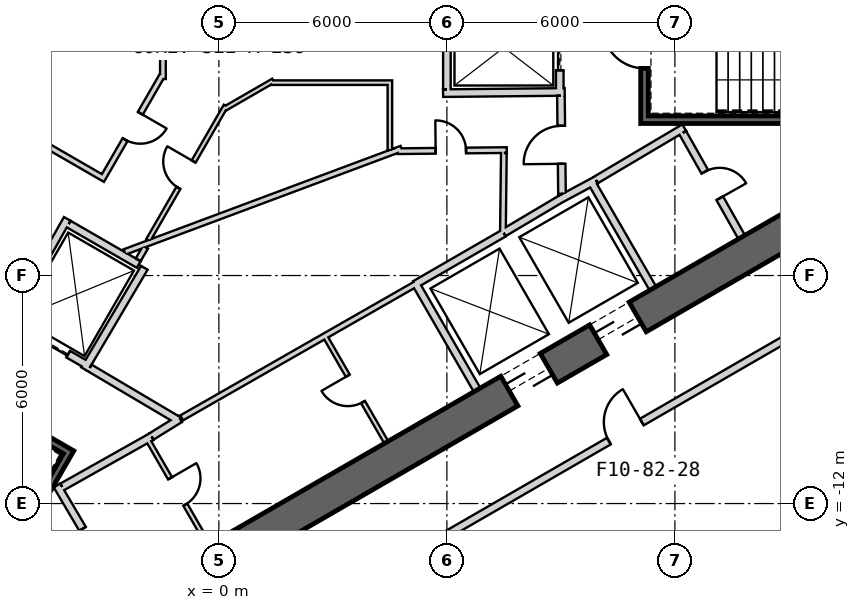
"""IFC4 building model, lengths in metres.
Left out: names, types, materials, properties, quantities, classifications, styles, units other than length and angle.
Written with IfcOpenShell. Run it as: python <this file> out.ifc"""

import sys

from ifc_helpers import new_model, si_unit, direction, frame, frame_2d, origin, place, context, subcontext, project, spatial, rectangle, extrude, element, fill, save


model = new_model("IFC4")
c1 = context("Model", 3, precision=1e-05, world=origin(), true_north=direction((0.0, 1.0)))
c2 = subcontext(c1, "Body", "Model", "MODEL_VIEW")
j1 = project(units=[si_unit("LENGTHUNIT", "METRE"), si_unit("PLANEANGLEUNIT", "RADIAN")], contexts=[c1])
p1 = place(None, origin())
s1 = spatial("IfcSite", under=j1, at=p1, CompositionType="ELEMENT")
p2 = place(p1, origin())
s2 = spatial("IfcBuilding", under=s1, at=p2, CompositionType="ELEMENT")
p3 = place(p2, frame((0.0, 0.0, 357.2)))
s3 = spatial("IfcBuildingStorey", under=s2, at=p3, CompositionType="ELEMENT", Elevation=357.2)
p4 = place(p3, frame((-7.825, -17.97, 0.0), z_axis=(0.0, 0.0, 1.0), x_axis=(0.866028369851, 0.499994862586, 0.0)))
e1 = element("IfcWall", 1, at=p4, inside=s3, PredefinedType="SHEAR", context=c2, shape_type="SweptSolid", body=[
    extrude(rectangle(XDim=31.523, YDim=0.9, at=frame_2d((15.762, 0.0))), origin(), (0.0, 0.0, 1.0), 3.9),
])
p5 = place(p4, frame((17.862, 0.0, 0.0)))
e2 = element("IfcOpeningElement", 2, at=p5, cuts=e1, PredefinedType="OPENING", context=c2, shape_type="SweptSolid", body=[
    extrude(rectangle(XDim=1.2, YDim=2.4, at=frame_2d((0.6, 1.2))), frame((0.0, 0.46, 0.0), z_axis=(0.0, -1.0, 0.0), x_axis=(1.0, 0.0, 0.0)), (0.0, 0.0, 1.0), 0.92),
])
p6 = place(p4, frame((20.562, 0.0, 0.0)))
e3 = element("IfcOpeningElement", 3, at=p6, cuts=e1, PredefinedType="OPENING", context=c2, shape_type="SweptSolid", body=[
    extrude(rectangle(XDim=1.2, YDim=2.4, at=frame_2d((0.6, 1.2))), frame((0.0, 0.46, 0.0), z_axis=(0.0, -1.0, 0.0), x_axis=(1.0, 0.0, 0.0)), (0.0, 0.0, 1.0), 0.92),
])
p7 = place(p4, frame((26.712, 0.0, 0.0)))
e4 = element("IfcOpeningElement", 4, at=p7, cuts=e1, PredefinedType="OPENING", context=c2, shape_type="SweptSolid", body=[
    extrude(rectangle(XDim=1.2, YDim=2.4, at=frame_2d((0.6, 1.2))), frame((0.0, 0.46, 0.0), z_axis=(0.0, -1.0, 0.0), x_axis=(1.0, 0.0, 0.0)), (0.0, 0.0, 1.0), 0.92),
])
p8 = place(p4, frame((3.612, 0.0, 0.0)))
e5 = element("IfcOpeningElement", 5, at=p8, cuts=e1, PredefinedType="OPENING", context=c2, shape_type="SweptSolid", body=[
    extrude(rectangle(XDim=1.2, YDim=2.4, at=frame_2d((0.6, 1.2))), frame((0.0, 0.46, 0.0), z_axis=(0.0, -1.0, 0.0), x_axis=(1.0, 0.0, 0.0)), (0.0, 0.0, 1.0), 0.92),
])
p9 = place(p3, frame((6.795, -9.01, 0.0), z_axis=(0.0, 0.0, 1.0), x_axis=(-0.499984717929, 0.866034226713, 0.0)))
e6 = element("IfcWall", 6, at=p9, inside=s3, PredefinedType="PLUMBINGWALL", context=c2, shape_type="SweptSolid", body=[
    extrude(rectangle(XDim=3.25, YDim=0.2, at=frame_2d((1.625, 0.0))), origin(), (0.0, 0.0, 1.0), 3.6),
])
p10 = place(p3, frame((5.159, -6.236, 0.0), z_axis=(0.0, 0.0, 1.0), x_axis=(0.866036505625, 0.499980770555, 0.0)))
e7 = element("IfcWall", 7, at=p10, inside=s3, PredefinedType="PLUMBINGWALL", context=c2, shape_type="SweptSolid", body=[
    extrude(rectangle(XDim=2.7, YDim=0.2, at=frame_2d((1.35, 0.0))), origin(), (0.0, 0.0, 1.0), 3.6),
])
p11 = place(p3, frame((9.795, -3.525, 0.0), z_axis=(0.0, 0.0, 1.0), x_axis=(0.499984717929, -0.866034226713, 0.0)))
e8 = element("IfcWall", 8, at=p11, inside=s3, PredefinedType="PLUMBINGWALL", context=c2, shape_type="SweptSolid", body=[
    extrude(rectangle(XDim=3.25, YDim=0.2, at=frame_2d((1.625, 0.0))), origin(), (0.0, 0.0, 1.0), 3.6),
])
p12 = place(p3, frame((8.974, -3.999, 0.0), z_axis=(0.0, 0.0, 1.0), x_axis=(0.880907015104, 0.473289373154, 0.0)))
e9 = element("IfcWall", 9, at=p12, inside=s3, PredefinedType="PLUMBINGWALL", context=c2, shape_type="SweptSolid", body=[
    extrude(rectangle(XDim=1.078, YDim=0.2, at=frame_2d((0.539, 0.0))), origin(), (0.0, 0.0, 1.0), 3.6),
])
p13 = place(p3, frame((7.493, -4.878, 0.0), z_axis=(0.0, 0.0, 1.0), x_axis=(0.859981807212, 0.510324691999, 0.0)))
e10 = element("IfcWall", 10, at=p13, inside=s3, PredefinedType="PLUMBINGWALL", context=c2, shape_type="SweptSolid", body=[
    extrude(rectangle(XDim=1.845, YDim=0.2, at=frame_2d((0.922, 0.0))), origin(), (0.0, 0.0, 1.0), 3.6),
])
p14 = place(p3, frame((11.1, -1.9, -0.3), z_axis=(0.0, 0.0, 1.0), x_axis=(1.0, 0.0, 0.0)))
e11 = element("IfcWall", 11, at=p14, inside=s3, PredefinedType="SHEAR", context=c2, shape_type="SweptSolid", body=[
    extrude(rectangle(XDim=7.9, YDim=0.2, at=frame_2d((3.95, 0.0))), origin(), (0.0, 0.0, 1.0), 3.9),
])
p15 = place(p3, frame((11.2, -1.8, -0.3), z_axis=(0.0, 0.0, 1.0), x_axis=(0.0, 1.0, 0.0)))
e12 = element("IfcWall", 12, at=p15, inside=s3, PredefinedType="SHEAR", context=c2, shape_type="SweptSolid", body=[
    extrude(rectangle(XDim=3.6, YDim=0.2, at=frame_2d((1.8, 0.0))), origin(), (0.0, 0.0, 1.0), 3.9),
])
p16 = place(p15, frame((1.25, 0.0, 0.3)))
e13 = element("IfcOpeningElement", 13, at=p16, cuts=e12, PredefinedType="OPENING", context=c2, shape_type="SweptSolid", body=[
    extrude(rectangle(XDim=1.1, YDim=2.1, at=frame_2d((0.55, 1.05))), frame((0.0, 0.11, 0.0), z_axis=(0.0, -1.0, 0.0), x_axis=(1.0, 0.0, 0.0)), (0.0, 0.0, 1.0), 0.22),
])
p17 = place(p3, frame((8.97, 1.2, 0.0), z_axis=(0.0, 0.0, 1.0), x_axis=(0.0, -1.0, 0.0)))
e14 = element("IfcWall", 14, at=p17, inside=s3, PredefinedType="PLUMBINGWALL", context=c2, shape_type="SweptSolid", body=[
    extrude(rectangle(XDim=2.4, YDim=0.2, at=frame_2d((1.2, 0.0))), origin(), (0.0, 0.0, 1.0), 3.6),
])
p18 = place(p17, frame((0.6, 0.0, 0.0)))
e15 = element("IfcOpeningElement", 15, at=p18, cuts=e14, PredefinedType="OPENING", context=c2, shape_type="SweptSolid", body=[
    extrude(rectangle(XDim=1.2, YDim=2.4, at=frame_2d((0.6, 1.2))), frame((0.0, 0.11, 0.0), z_axis=(0.0, -1.0, 0.0), x_axis=(1.0, 0.0, 0.0)), (0.0, 0.0, 1.0), 0.22),
])
p19 = place(p3, frame((5.9, -1.201, 0.0), z_axis=(0.0, 0.0, 1.0), x_axis=(0.999950064753, 0.009993397809, 0.0)))
e16 = element("IfcWall", 16, at=p19, inside=s3, PredefinedType="PLUMBINGWALL", context=c2, shape_type="SweptSolid", body=[
    extrude(rectangle(XDim=3.2, YDim=0.2, at=frame_2d((1.6, 0.0))), origin(), (0.0, 0.0, 1.0), 3.6),
])
p20 = place(p3, frame((6.0, -1.1, 0.0), z_axis=(0.0, 0.0, 1.0), x_axis=(0.0, 1.0, 0.0)))
e17 = element("IfcWall", 17, at=p20, inside=s3, PredefinedType="PLUMBINGWALL", context=c2, shape_type="SweptSolid", body=[
    extrude(rectangle(XDim=2.28, YDim=0.2, at=frame_2d((1.14, 0.0))), origin(), (0.0, 0.0, 1.0), 3.6),
])
p21 = place(p3, frame((-3.905, -10.563, -0.3), z_axis=(0.0, 0.0, 1.0), x_axis=(-0.500012932018, -0.866017937352, 0.0)))
e18 = element("IfcWall", 18, at=p21, inside=s3, PredefinedType="SHEAR", context=c2, shape_type="SweptSolid", body=[
    extrude(rectangle(XDim=8.1, YDim=0.2, at=frame_2d((4.05, 0.0))), origin(), (0.0, 0.0, 1.0), 3.9),
])
p22 = place(p3, frame((-4.041, -10.599, -0.3), z_axis=(0.0, 0.0, 1.0), x_axis=(-0.866047807691, 0.499961193289, 0.0)))
e19 = element("IfcWall", 19, at=p22, inside=s3, PredefinedType="SHEAR", context=c2, shape_type="SweptSolid", body=[
    extrude(rectangle(XDim=3.6, YDim=0.2, at=frame_2d((1.8, 0.0))), origin(), (0.0, 0.0, 1.0), 3.9),
])
p23 = place(p22, frame((1.25, 0.0, 0.3)))
e20 = element("IfcOpeningElement", 20, at=p23, cuts=e19, PredefinedType="OPENING", context=c2, shape_type="SweptSolid", body=[
    extrude(rectangle(XDim=1.1, YDim=2.1, at=frame_2d((0.55, 1.05))), frame((0.0, 0.11, 0.0), z_axis=(0.0, -1.0, 0.0), x_axis=(1.0, 0.0, 0.0)), (0.0, 0.0, 1.0), 0.22),
])
p24 = place(p3, frame((-3.446, -8.368, 0.0), z_axis=(0.0, 0.0, 1.0), x_axis=(-0.866024647952, 0.500001309137, 0.0)))
e21 = element("IfcWall", 21, at=p24, inside=s3, PredefinedType="PLUMBINGWALL", context=c2, shape_type="SweptSolid", body=[
    extrude(rectangle(XDim=2.4, YDim=0.2, at=frame_2d((1.2, 0.0))), origin(), (0.0, 0.0, 1.0), 3.6),
])
p25 = place(p24, frame((0.6, 0.0, 0.0)))
e22 = element("IfcOpeningElement", 22, at=p25, cuts=e21, PredefinedType="OPENING", context=c2, shape_type="SweptSolid", body=[
    extrude(rectangle(XDim=1.2, YDim=2.4, at=frame_2d((0.6, 1.2))), frame((0.0, 0.11, 0.0), z_axis=(0.0, -1.0, 0.0), x_axis=(1.0, 0.0, 0.0)), (0.0, 0.0, 1.0), 0.22),
])
p26 = place(p3, frame((-1.961, -5.796, 0.0), z_axis=(0.0, 0.0, 1.0), x_axis=(-0.508647062354, -0.860975125052, 0.0)))
e23 = element("IfcWall", 23, at=p26, inside=s3, PredefinedType="PLUMBINGWALL", context=c2, shape_type="SweptSolid", body=[
    extrude(rectangle(XDim=3.1, YDim=0.2, at=frame_2d((1.55, 0.0))), origin(), (0.0, 0.0, 1.0), 3.6),
])
p27 = place(p3, frame((-3.99, -4.509, 0.0), z_axis=(0.0, 0.0, 1.0), x_axis=(-0.491358283181, -0.870957540612, 0.0)))
e24 = element("IfcWall", 24, at=p27, inside=s3, PredefinedType="PLUMBINGWALL", context=c2, shape_type="SweptSolid", body=[
    extrude(rectangle(XDim=3.2, YDim=0.2, at=frame_2d((1.6, 0.0))), origin(), (0.0, 0.0, 1.0), 3.6),
])
p28 = place(p3, frame((-3.953, -4.646, 0.0), z_axis=(0.0, 0.0, 1.0), x_axis=(0.866065302921, -0.4999308863, 0.0)))
e25 = element("IfcWall", 25, at=p28, inside=s3, PredefinedType="PLUMBINGWALL", context=c2, shape_type="SweptSolid", body=[
    extrude(rectangle(XDim=2.264, YDim=0.2, at=frame_2d((1.132, 0.0))), origin(), (0.0, 0.0, 1.0), 3.6),
])
p29 = place(p3, frame((2.067, -11.74, 0.0), z_axis=(0.0, 0.0, 1.0), x_axis=(-0.499984717929, 0.866034226713, 0.0)))
e26 = element("IfcWall", 26, at=p29, inside=s3, PredefinedType="PARTITIONING", context=c2, shape_type="SweptSolid", body=[
    extrude(rectangle(XDim=3.25, YDim=0.12, at=frame_2d((1.625, 0.0))), origin(), (0.0, 0.0, 1.0), 3.6),
])
p30 = place(p3, frame((-4.26, -11.524, 0.0), z_axis=(0.0, 0.0, 1.0), x_axis=(0.507997497166, -0.861358544901, 0.0)))
e27 = element("IfcWall", 27, at=p30, inside=s3, PredefinedType="PARTITIONING", context=c2, shape_type="SweptSolid", body=[
    extrude(rectangle(XDim=3.35, YDim=0.2, at=frame_2d((1.675, 0.0))), origin(), (0.0, 0.0, 1.0), 3.6),
])
p31 = place(p3, frame((-1.024, -9.771, 0.0), z_axis=(0.0, 0.0, 1.0), x_axis=(-0.866029903013, -0.499992207027, 0.0)))
e28 = element("IfcWall", 28, at=p31, inside=s3, PredefinedType="PARTITIONING", context=c2, shape_type="SweptSolid", body=[
    extrude(rectangle(XDim=3.578, YDim=0.2, at=frame_2d((1.789, 0.0))), origin(), (0.0, 0.0, 1.0), 3.6),
])
p32 = place(p31, frame((1.389, 0.0, 0.0)))
e29 = element("IfcOpeningElement", 29, at=p32, cuts=e28, PredefinedType="OPENING", context=c2, shape_type="SweptSolid", body=[
    extrude(rectangle(XDim=0.8, YDim=2.1, at=frame_2d((0.4, 1.05))), frame((0.0, 0.11, 0.0), z_axis=(0.0, -1.0, 0.0), x_axis=(1.0, 0.0, 0.0)), (0.0, 0.0, 1.0), 0.22),
])
p33 = place(p3, frame((-1.023, -9.772, 0.0), z_axis=(0.0, 0.0, 1.0), x_axis=(0.874290944206, 0.485402250592, 0.0)))
e30 = element("IfcWall", 30, at=p33, inside=s3, PredefinedType="PARTITIONING", context=c2, shape_type="SweptSolid", body=[
    extrude(rectangle(XDim=1.723, YDim=0.12, at=frame_2d((0.861, 0.0))), origin(), (0.0, 0.0, 1.0), 3.6),
])
p34 = place(p3, frame((0.483, -8.936, 0.0), z_axis=(0.0, 0.0, 1.0), x_axis=(0.866028230842, 0.499995103361, 0.0)))
e31 = element("IfcWall", 31, at=p34, inside=s3, PredefinedType="PARTITIONING", context=c2, shape_type="SweptSolid", body=[
    extrude(rectangle(XDim=5.4, YDim=0.12, at=frame_2d((2.7, 0.0))), origin(), (0.0, 0.0, 1.0), 3.6),
])
p35 = place(p34, frame((2.3, 0.0, 0.0)))
e32 = element("IfcOpeningElement", 32, at=p35, cuts=e31, PredefinedType="OPENING", context=c2, shape_type="SweptSolid", body=[
    extrude(rectangle(XDim=0.8, YDim=2.1, at=frame_2d((0.4, 1.05))), frame((0.0, 0.07, 0.0), z_axis=(0.0, -1.0, 0.0), x_axis=(1.0, 0.0, 0.0)), (0.0, 0.0, 1.0), 0.14),
])
p36 = place(p3, frame((12.245, -2.109, 0.0), z_axis=(0.0, 0.0, 1.0), x_axis=(-0.860414880418, -0.509594185166, 0.0)))
e33 = element("IfcWall", 33, at=p36, inside=s3, PredefinedType="PARTITIONING", context=c2, shape_type="SweptSolid", body=[
    extrude(rectangle(XDim=2.7, YDim=0.2, at=frame_2d((1.35, 0.0))), origin(), (0.0, 0.0, 1.0), 3.6),
])
p37 = place(p3, frame((13.758, -4.99, 0.0), z_axis=(0.0, 0.0, 1.0), x_axis=(-0.491993409184, 0.87059892334, 0.0)))
e34 = element("IfcWall", 34, at=p37, inside=s3, PredefinedType="PARTITIONING", context=c2, shape_type="SweptSolid", body=[
    extrude(rectangle(XDim=3.15, YDim=0.2, at=frame_2d((1.575, 0.0))), origin(), (0.0, 0.0, 1.0), 3.6),
])
p38 = place(p37, frame((1.175, 0.0, 0.0)))
e35 = element("IfcOpeningElement", 35, at=p38, cuts=e34, PredefinedType="OPENING", context=c2, shape_type="SweptSolid", body=[
    extrude(rectangle(XDim=0.8, YDim=2.1, at=frame_2d((0.4, 1.05))), frame((0.0, 0.11, 0.0), z_axis=(0.0, -1.0, 0.0), x_axis=(1.0, 0.0, 0.0)), (0.0, 0.0, 1.0), 0.22),
])
p39 = place(p3, frame((9.029, -3.851, 0.0), z_axis=(0.0, 0.0, 1.0), x_axis=(-0.010783593937, 0.99994185536, 0.0)))
e36 = element("IfcWall", 36, at=p39, inside=s3, PredefinedType="PARTITIONING", context=c2, shape_type="SweptSolid", body=[
    extrude(rectangle(XDim=2.581, YDim=0.2, at=frame_2d((1.291, 0.0))), origin(), (0.0, 0.0, 1.0), 3.6),
])
p40 = place(p39, frame((0.791, 0.0, 0.0)))
e37 = element("IfcOpeningElement", 37, at=p40, cuts=e36, PredefinedType="OPENING", context=c2, shape_type="SweptSolid", body=[
    extrude(rectangle(XDim=1.0, YDim=2.1, at=frame_2d((0.5, 1.05))), frame((0.0, 0.11, 0.0), z_axis=(0.0, -1.0, 0.0), x_axis=(1.0, 0.0, 0.0)), (0.0, 0.0, 1.0), 0.22),
])
p41 = place(p3, frame((-3.401, -8.43, 0.0), z_axis=(0.0, 0.0, 1.0), x_axis=(0.860630814782, -0.509229418482, 0.0)))
e38 = element("IfcWall", 38, at=p41, inside=s3, PredefinedType="PARTITIONING", context=c2, shape_type="SweptSolid", body=[
    extrude(rectangle(XDim=2.582, YDim=0.2, at=frame_2d((1.291, 0.0))), origin(), (0.0, 0.0, 1.0), 3.6),
])
p42 = place(p3, frame((0.224, -1.761, 0.0), z_axis=(0.0, 0.0, 1.0), x_axis=(-0.494327216836, -0.869275907118, 0.0)))
e39 = element("IfcWall", 39, at=p42, inside=s3, PredefinedType="PARTITIONING", context=c2, shape_type="SweptSolid", body=[
    extrude(rectangle(XDim=4.487, YDim=0.12, at=frame_2d((2.244, 0.0))), origin(), (0.0, 0.0, 1.0), 3.6),
])
p43 = place(p42, frame((1.895, 0.0, 0.0)))
e40 = element("IfcOpeningElement", 40, at=p43, cuts=e39, PredefinedType="OPENING", context=c2, shape_type="SweptSolid", body=[
    extrude(rectangle(XDim=0.8, YDim=2.1, at=frame_2d((0.4, 1.05))), frame((0.0, 0.07, 0.0), z_axis=(0.0, -1.0, 0.0), x_axis=(1.0, 0.0, 0.0)), (0.0, 0.0, 1.0), 0.14),
])
p44 = place(p3, frame((1.605, -1.023, 0.0), z_axis=(0.0, 0.0, 1.0), x_axis=(-0.866001581989, -0.50004125829, 0.0)))
e41 = element("IfcWall", 41, at=p44, inside=s3, PredefinedType="PARTITIONING", context=c2, shape_type="SweptSolid", body=[
    extrude(rectangle(XDim=1.635, YDim=0.12, at=frame_2d((0.817, 0.0))), origin(), (0.0, 0.0, 1.0), 3.6),
])
p45 = place(p3, frame((4.56, -1.075, 0.0), z_axis=(0.0, 0.0, 1.0), x_axis=(-1.0, 0.0, 0.0)))
e42 = element("IfcWall", 42, at=p45, inside=s3, PredefinedType="PARTITIONING", context=c2, shape_type="SweptSolid", body=[
    extrude(rectangle(XDim=3.026, YDim=0.12, at=frame_2d((1.513, 0.0))), origin(), (0.0, 0.0, 1.0), 3.6),
])
p46 = place(p3, frame((4.5, -2.76, 0.0), z_axis=(0.0, 0.0, 1.0), x_axis=(0.0, 1.0, 0.0)))
e43 = element("IfcWall", 43, at=p46, inside=s3, PredefinedType="PARTITIONING", context=c2, shape_type="SweptSolid", body=[
    extrude(rectangle(XDim=1.625, YDim=0.12, at=frame_2d((0.812, 0.0))), origin(), (0.0, 0.0, 1.0), 3.6),
])
p47 = place(p3, frame((7.56, -2.7, 0.0), z_axis=(0.0, 0.0, 1.0), x_axis=(-1.0, 0.0, 0.0)))
e44 = element("IfcWall", 44, at=p47, inside=s3, PredefinedType="PARTITIONING", context=c2, shape_type="SweptSolid", body=[
    extrude(rectangle(XDim=3.0, YDim=0.12, at=frame_2d((1.5, 0.0))), origin(), (0.0, 0.0, 1.0), 3.6),
])
p48 = place(p3, frame((7.475, -4.865, 0.0), z_axis=(0.0, 0.0, 1.0), x_axis=(0.011716133148, 0.999931363757, 0.0)))
e45 = element("IfcWall", 45, at=p48, inside=s3, PredefinedType="PARTITIONING", context=c2, shape_type="SweptSolid", body=[
    extrude(rectangle(XDim=2.105, YDim=0.12, at=frame_2d((1.052, 0.0))), origin(), (0.0, 0.0, 1.0), 3.6),
])
p49 = place(p3, frame((-1.689, -0.879, 0.0), z_axis=(0.0, 0.0, 1.0), x_axis=(0.0, 1.0, 0.0)))
e46 = element("IfcWall", 46, at=p49, inside=s3, PredefinedType="PARTITIONING", context=c2, shape_type="SweptSolid", body=[
    extrude(rectangle(XDim=1.635, YDim=0.12, at=frame_2d((0.818, 0.0))), origin(), (0.0, 0.0, 1.0), 3.6),
])
p50 = place(p3, frame((-3.211, -3.412, 0.0), z_axis=(0.0, 0.0, 1.0), x_axis=(0.499983190554, 0.866035108505, 0.0)))
e47 = element("IfcWall", 47, at=p50, inside=s3, PredefinedType="PARTITIONING", context=c2, shape_type="SweptSolid", body=[
    extrude(rectangle(XDim=3.026, YDim=0.12, at=frame_2d((1.513, 0.0))), origin(), (0.0, 0.0, 1.0), 3.6),
])
p51 = place(p50, frame((1.143, 0.0, 0.0)))
e48 = element("IfcOpeningElement", 48, at=p51, cuts=e47, PredefinedType="OPENING", context=c2, shape_type="SweptSolid", body=[
    extrude(rectangle(XDim=0.8, YDim=2.1, at=frame_2d((0.4, 1.05))), frame((0.0, 0.07, 0.0), z_axis=(0.0, -1.0, 0.0), x_axis=(1.0, 0.0, 0.0)), (0.0, 0.0, 1.0), 0.14),
])
p52 = place(p3, frame((-4.64, -2.517, 0.0), z_axis=(0.0, 0.0, 1.0), x_axis=(0.866015446554, -0.500017246033, 0.0)))
e49 = element("IfcWall", 49, at=p52, inside=s3, PredefinedType="PARTITIONING", context=c2, shape_type="SweptSolid", body=[
    extrude(rectangle(XDim=1.625, YDim=0.12, at=frame_2d((0.812, 0.0))), origin(), (0.0, 0.0, 1.0), 3.6),
])
p53 = place(p3, frame((1.303, -17.376, 0.0), z_axis=(0.0, 0.0, 1.0), x_axis=(0.866024719138, 0.50000118584, 0.0)))
e50 = element("IfcWall", 50, at=p53, inside=s3, PredefinedType="PARTITIONING", context=c2, shape_type="SweptSolid", body=[
    extrude(rectangle(XDim=14.305, YDim=0.2, at=frame_2d((7.152, 0.0))), origin(), (0.0, 0.0, 1.0), 3.07),
])
p54 = place(p53, frame((6.644, 0.0, 0.0)))
e51 = element("IfcOpeningElement", 51, at=p54, cuts=e50, PredefinedType="OPENING", context=c2, shape_type="SweptSolid", body=[
    extrude(rectangle(XDim=1.0, YDim=2.1, at=frame_2d((0.5, 1.05))), frame((0.0, 0.11, 0.0), z_axis=(0.0, -1.0, 0.0), x_axis=(1.0, 0.0, 0.0)), (0.0, 0.0, 1.0), 0.22),
])
p55 = place(p3, frame((13.691, -10.224, 0.0), z_axis=(0.0, 0.0, 1.0), x_axis=(0.866025593094, 0.499999672107, 0.0)))
e52 = element("IfcWall", 52, at=p55, inside=s3, PredefinedType="PARTITIONING", context=c2, shape_type="SweptSolid", body=[
    extrude(rectangle(XDim=9.631, YDim=0.2, at=frame_2d((4.815, 0.0))), origin(), (0.0, 0.0, 1.0), 2.97),
])
p56 = place(p55, frame((4.315, 0.0, 0.0)))
e53 = element("IfcOpeningElement", 53, at=p56, cuts=e52, PredefinedType="OPENING", context=c2, shape_type="SweptSolid", body=[
    extrude(rectangle(XDim=1.0, YDim=2.1, at=frame_2d((0.5, 1.05))), frame((0.0, 0.11, 0.0), z_axis=(0.0, -1.0, 0.0), x_axis=(1.0, 0.0, 0.0)), (0.0, 0.0, 1.0), 0.22),
])
p57 = place(p3, frame((13.731, -10.317, 0.0), z_axis=(0.0, 0.0, 1.0), x_axis=(0.544248008525, -0.838924373955, 0.0)))
e54 = element("IfcWall", 54, at=p57, inside=s3, PredefinedType="PARTITIONING", context=c2, shape_type="SweptSolid", body=[
    extrude(rectangle(XDim=8.325, YDim=0.2, at=frame_2d((4.162, 0.0))), origin(), (0.0, 0.0, 1.0), 3.6),
])
p58 = place(p16, origin())
e55 = element("IfcDoor", 55, at=p58, inside=s3, OperationType="SINGLE_SWING_RIGHT", PredefinedType="USERDEFINED", context=c2, shape_type="SweptSolid", body=[
    extrude(rectangle(XDim=1.1, YDim=2.1, at=frame_2d((0.55, 1.05))), frame((0.0, 0.025, 0.0), z_axis=(0.0, -1.0, 0.0), x_axis=(1.0, 0.0, 0.0)), (0.0, 0.0, 1.0), 0.05),
])
fill(e13, e55)
p59 = place(p40, origin())
e56 = element("IfcDoor", 56, at=p59, inside=s3, OperationType="SINGLE_SWING_LEFT", PredefinedType="USERDEFINED", context=c2, shape_type="SweptSolid", body=[
    extrude(rectangle(XDim=1.0, YDim=2.1, at=frame_2d((0.5, 1.05))), frame((0.0, 0.025, 0.0), z_axis=(0.0, -1.0, 0.0), x_axis=(1.0, 0.0, 0.0)), (0.0, 0.0, 1.0), 0.05),
])
fill(e37, e56)
p60 = place(p18, origin())
e57 = element("IfcDoor", 57, at=p60, inside=s3, OperationType="SLIDING_TO_LEFT", PredefinedType="USERDEFINED", context=c2, shape_type="SweptSolid", body=[
    extrude(rectangle(XDim=1.2, YDim=2.4, at=frame_2d((0.6, 1.2))), frame((0.0, 0.025, 0.0), z_axis=(0.0, -1.0, 0.0), x_axis=(1.0, 0.0, 0.0)), (0.0, 0.0, 1.0), 0.05),
])
fill(e15, e57)
p61 = place(p25, origin())
e58 = element("IfcDoor", 58, at=p61, inside=s3, OperationType="SLIDING_TO_LEFT", PredefinedType="USERDEFINED", context=c2, shape_type="SweptSolid", body=[
    extrude(rectangle(XDim=1.2, YDim=2.4, at=frame_2d((0.6, 1.2))), frame((0.0, 0.025, 0.0), z_axis=(0.0, -1.0, 0.0), x_axis=(1.0, 0.0, 0.0)), (0.0, 0.0, 1.0), 0.05),
])
fill(e22, e58)
p62 = place(p43, origin())
e59 = element("IfcDoor", 59, at=p62, inside=s3, OperationType="SINGLE_SWING_LEFT", PredefinedType="USERDEFINED", context=c2, shape_type="SweptSolid", body=[
    extrude(rectangle(XDim=0.8, YDim=2.1, at=frame_2d((0.4, 1.05))), frame((0.0, 0.025, 0.0), z_axis=(0.0, -1.0, 0.0), x_axis=(1.0, 0.0, 0.0)), (0.0, 0.0, 1.0), 0.05),
])
fill(e40, e59)
p63 = place(p51, origin())
e60 = element("IfcDoor", 60, at=p63, inside=s3, OperationType="SINGLE_SWING_RIGHT", PredefinedType="USERDEFINED", context=c2, shape_type="SweptSolid", body=[
    extrude(rectangle(XDim=0.8, YDim=2.1, at=frame_2d((0.4, 1.05))), frame((0.0, 0.025, 0.0), z_axis=(0.0, -1.0, 0.0), x_axis=(1.0, 0.0, 0.0)), (0.0, 0.0, 1.0), 0.05),
])
fill(e48, e60)
p64 = place(p32, origin())
e61 = element("IfcDoor", 61, at=p64, inside=s3, OperationType="SINGLE_SWING_RIGHT", PredefinedType="USERDEFINED", context=c2, shape_type="SweptSolid", body=[
    extrude(rectangle(XDim=0.8, YDim=2.1, at=frame_2d((0.4, 1.05))), frame((0.0, 0.025, 0.0), z_axis=(0.0, -1.0, 0.0), x_axis=(1.0, 0.0, 0.0)), (0.0, 0.0, 1.0), 0.05),
])
fill(e29, e61)
p65 = place(p35, origin())
e62 = element("IfcDoor", 62, at=p65, inside=s3, OperationType="SINGLE_SWING_RIGHT", PredefinedType="USERDEFINED", context=c2, shape_type="SweptSolid", body=[
    extrude(rectangle(XDim=0.8, YDim=2.1, at=frame_2d((0.4, 1.05))), frame((0.0, 0.025, 0.0), z_axis=(0.0, -1.0, 0.0), x_axis=(1.0, 0.0, 0.0)), (0.0, 0.0, 1.0), 0.05),
])
fill(e32, e62)
p66 = place(p38, origin())
e63 = element("IfcDoor", 63, at=p66, inside=s3, OperationType="SINGLE_SWING_LEFT", PredefinedType="USERDEFINED", context=c2, shape_type="SweptSolid", body=[
    extrude(rectangle(XDim=0.8, YDim=2.1, at=frame_2d((0.4, 1.05))), frame((0.0, 0.025, 0.0), z_axis=(0.0, -1.0, 0.0), x_axis=(1.0, 0.0, 0.0)), (0.0, 0.0, 1.0), 0.05),
])
fill(e35, e63)
p67 = place(p5, origin())
e64 = element("IfcDoor", 64, at=p67, inside=s3, OperationType="SLIDING_TO_LEFT", PredefinedType="USERDEFINED", context=c2, shape_type="SweptSolid", body=[
    extrude(rectangle(XDim=1.2, YDim=2.4, at=frame_2d((0.6, 1.2))), frame((0.0, 0.025, 0.0), z_axis=(0.0, -1.0, 0.0), x_axis=(1.0, 0.0, 0.0)), (0.0, 0.0, 1.0), 0.05),
])
fill(e2, e64)
p68 = place(p6, origin())
e65 = element("IfcDoor", 65, at=p68, inside=s3, OperationType="SLIDING_TO_LEFT", PredefinedType="USERDEFINED", context=c2, shape_type="SweptSolid", body=[
    extrude(rectangle(XDim=1.2, YDim=2.4, at=frame_2d((0.6, 1.2))), frame((0.0, 0.025, 0.0), z_axis=(0.0, -1.0, 0.0), x_axis=(1.0, 0.0, 0.0)), (0.0, 0.0, 1.0), 0.05),
])
fill(e3, e65)
save(model, sys.argv[1])
